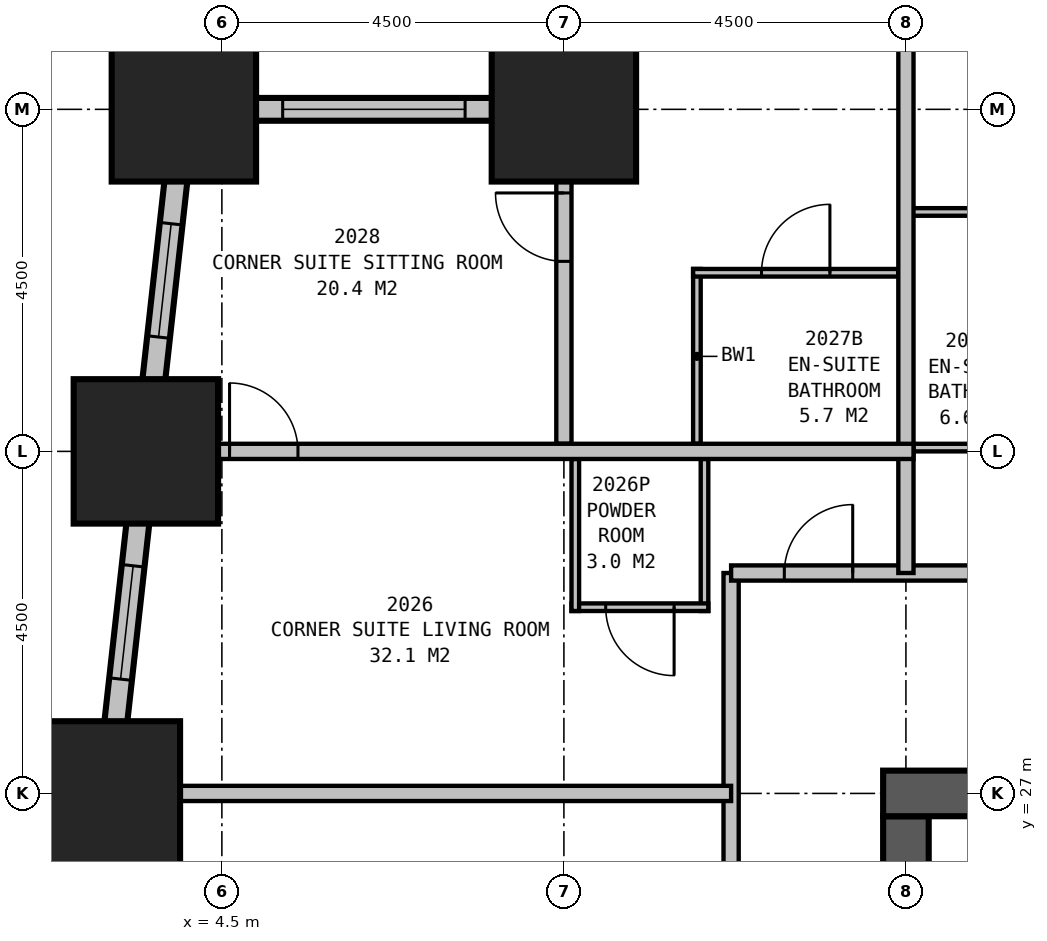
"""IFC4 building model, lengths in metres.
Left out: names, types, materials, properties, quantities, classifications, styles, units other than length and angle.
Written with IfcOpenShell. Run it as: python <this file> out.ifc"""

import sys

from ifc_helpers import new_model, si_unit, direction, frame, frame_2d, origin, origin_2d, place, context, subcontext, project, spatial, rectangle, extrude, element, fill, save


model = new_model("IFC4")
c1 = context("Model", 3, precision=1e-05, world=origin(), true_north=direction((0.0, 1.0)))
c2 = subcontext(c1, "Body", "Model", "MODEL_VIEW")
j1 = project(units=[si_unit("LENGTHUNIT", "METRE"), si_unit("PLANEANGLEUNIT", "RADIAN")], contexts=[c1])
p1 = place(None, origin())
s1 = spatial("IfcSite", under=j1, at=p1, CompositionType="ELEMENT")
p2 = place(p1, origin())
s2 = spatial("IfcBuilding", under=s1, at=p2, CompositionType="ELEMENT")
p3 = place(p2, frame((0.0, 0.0, 82.2)))
s3 = spatial("IfcBuildingStorey", under=s2, at=p3, CompositionType="ELEMENT", Elevation=82.2)
for number, where, z_axis, x_axis in (
    (1, (9.0, 36.0, 0.0), (0.0, 0.0, 1.0), (1.0, 0.0, 0.0)),
    (2, (4.0, 36.0, 0.0), (0.0, 0.0, 1.0), (1.0, 0.0, 0.0)),
    (3, (3.5, 31.5, 0.0), (0.0, 0.0, 1.0), (1.0, 0.0, 0.0)),
    (4, (3.0, 27.0, 0.0), (0.0, 0.0, 1.0), (1.0, 0.0, 0.0)),
):
    element("IfcColumn", number, at=place(p3, frame(where, z_axis=z_axis, x_axis=x_axis)), inside=s3, PredefinedType="COLUMN", context=c2, shape_type="SweptSolid", body=[
        extrude(rectangle(XDim=1.9, YDim=1.9, at=origin_2d()), origin(), (0.0, 0.0, 1.0), 3.5),
    ])
p4 = place(p3, frame((36.3, 27.0, 0.0), z_axis=(0.0, 0.0, 1.0), x_axis=(-1.0, 0.0, 0.0)))
e5 = element("IfcWall", 5, at=p4, inside=s3, PredefinedType="SHEAR", context=c2, shape_type="SweptSolid", body=[
    extrude(rectangle(XDim=23.1, YDim=0.6, at=frame_2d((11.55, 0.0))), origin(), (0.0, 0.0, 1.0), 3.5),
])
p5 = place(p4, frame((17.05, 0.0, 0.0)))
e6 = element("IfcOpeningElement", 6, at=p5, cuts=e5, PredefinedType="OPENING", context=c2, shape_type="SweptSolid", body=[
    extrude(rectangle(XDim=1.0, YDim=2.1, at=frame_2d((0.5, 1.05))), frame((0.0, 0.31, 0.0), z_axis=(0.0, -1.0, 0.0), x_axis=(1.0, 0.0, 0.0)), (0.0, 0.0, 1.0), 0.62),
])
p6 = place(p4, frame((12.05, 0.0, 0.0)))
e7 = element("IfcOpeningElement", 7, at=p6, cuts=e5, PredefinedType="OPENING", context=c2, shape_type="SweptSolid", body=[
    extrude(rectangle(XDim=1.0, YDim=2.1, at=frame_2d((0.5, 1.05))), frame((0.0, 0.31, 0.0), z_axis=(0.0, -1.0, 0.0), x_axis=(1.0, 0.0, 0.0)), (0.0, 0.0, 1.0), 0.62),
])
p7 = place(p4, frame((7.05, 0.0, 0.0)))
e8 = element("IfcOpeningElement", 8, at=p7, cuts=e5, PredefinedType="OPENING", context=c2, shape_type="SweptSolid", body=[
    extrude(rectangle(XDim=1.0, YDim=2.1, at=frame_2d((0.5, 1.05))), frame((0.0, 0.31, 0.0), z_axis=(0.0, -1.0, 0.0), x_axis=(1.0, 0.0, 0.0)), (0.0, 0.0, 1.0), 0.62),
])
p8 = place(p3, frame((13.5, 26.7, 0.0), z_axis=(0.0, 0.0, 1.0), x_axis=(0.0, -1.0, 0.0)))
e9 = element("IfcWall", 9, at=p8, inside=s3, PredefinedType="SHEAR", context=c2, shape_type="SweptSolid", body=[
    extrude(rectangle(XDim=6.7, YDim=0.6, at=frame_2d((3.35, 0.0))), origin(), (0.0, 0.0, 1.0), 3.5),
])
p9 = place(p3, frame((9.0, 40.65, 0.0), z_axis=(0.0, 0.0, 1.0), x_axis=(0.0, -1.0, 0.0)))
e10 = element("IfcWall", 10, at=p9, inside=s3, PredefinedType="STANDARD", context=c2, shape_type="SweptSolid", body=[
    extrude(rectangle(XDim=4.8, YDim=0.3, at=frame_2d((2.4, 0.0))), origin(), (0.0, 0.0, 1.0), 2.1),
])
p10 = place(p9, frame((1.65, 0.0, 0.5)))
e11 = element("IfcOpeningElement", 11, at=p10, cuts=e10, PredefinedType="OPENING", context=c2, shape_type="SweptSolid", body=[
    extrude(rectangle(XDim=1.5, YDim=1.4, at=frame_2d((0.75, 0.7))), frame((0.0, 0.16, 0.0), z_axis=(0.0, -1.0, 0.0), x_axis=(1.0, 0.0, 0.0)), (0.0, 0.0, 1.0), 0.32),
])
p11 = place(p3, frame((9.15, 36.0, 0.0), z_axis=(0.0, 0.0, 1.0), x_axis=(-1.0, 0.0, 0.0)))
e12 = element("IfcWall", 12, at=p11, inside=s3, PredefinedType="STANDARD", context=c2, shape_type="SweptSolid", body=[
    extrude(rectangle(XDim=5.3, YDim=0.3, at=frame_2d((2.65, 0.0))), origin(), (0.0, 0.0, 1.0), 2.1),
])
p12 = place(p11, frame((1.45, 0.0, 0.5)))
e13 = element("IfcOpeningElement", 13, at=p12, cuts=e12, PredefinedType="OPENING", context=c2, shape_type="SweptSolid", body=[
    extrude(rectangle(XDim=2.4, YDim=1.4, at=frame_2d((1.2, 0.7))), frame((0.0, 0.16, 0.0), z_axis=(0.0, -1.0, 0.0), x_axis=(1.0, 0.0, 0.0)), (0.0, 0.0, 1.0), 0.32),
])
p13 = place(p3, frame((4.017, 36.149, 0.0), z_axis=(0.0, 0.0, 1.0), x_axis=(-0.110433201132, -0.993883548555, 0.0)))
e14 = element("IfcWall", 14, at=p13, inside=s3, PredefinedType="STANDARD", context=c2, shape_type="SweptSolid", body=[
    extrude(rectangle(XDim=31.994, YDim=0.3, at=frame_2d((15.997, 0.0))), origin(), (0.0, 0.0, 1.0), 2.1),
])
p14 = place(p13, frame((1.664, 0.0, 0.5)))
e15 = element("IfcOpeningElement", 15, at=p14, cuts=e14, PredefinedType="OPENING", context=c2, shape_type="SweptSolid", body=[
    extrude(rectangle(XDim=1.5, YDim=1.4, at=frame_2d((0.75, 0.7))), frame((0.0, 0.16, 0.0), z_axis=(0.0, -1.0, 0.0), x_axis=(1.0, 0.0, 0.0)), (0.0, 0.0, 1.0), 0.32),
])
p15 = place(p13, frame((6.192, 0.0, 0.5)))
e16 = element("IfcOpeningElement", 16, at=p15, cuts=e14, PredefinedType="OPENING", context=c2, shape_type="SweptSolid", body=[
    extrude(rectangle(XDim=1.5, YDim=1.4, at=frame_2d((0.75, 0.7))), frame((0.0, 0.16, 0.0), z_axis=(0.0, -1.0, 0.0), x_axis=(1.0, 0.0, 0.0)), (0.0, 0.0, 1.0), 0.32),
])
p16 = place(p13, frame((10.719, 0.0, 0.5)))
e17 = element("IfcOpeningElement", 17, at=p16, cuts=e14, PredefinedType="OPENING", context=c2, shape_type="SweptSolid", body=[
    extrude(rectangle(XDim=1.5, YDim=1.4, at=frame_2d((0.75, 0.7))), frame((0.0, 0.16, 0.0), z_axis=(0.0, -1.0, 0.0), x_axis=(1.0, 0.0, 0.0)), (0.0, 0.0, 1.0), 0.32),
])
p17 = place(p13, frame((15.247, 0.0, 0.5)))
e18 = element("IfcOpeningElement", 18, at=p17, cuts=e14, PredefinedType="OPENING", context=c2, shape_type="SweptSolid", body=[
    extrude(rectangle(XDim=1.5, YDim=1.4, at=frame_2d((0.75, 0.7))), frame((0.0, 0.16, 0.0), z_axis=(0.0, -1.0, 0.0), x_axis=(1.0, 0.0, 0.0)), (0.0, 0.0, 1.0), 0.32),
])
p18 = place(p13, frame((19.775, 0.0, 0.5)))
e19 = element("IfcOpeningElement", 19, at=p18, cuts=e14, PredefinedType="OPENING", context=c2, shape_type="SweptSolid", body=[
    extrude(rectangle(XDim=1.5, YDim=1.4, at=frame_2d((0.75, 0.7))), frame((0.0, 0.16, 0.0), z_axis=(0.0, -1.0, 0.0), x_axis=(1.0, 0.0, 0.0)), (0.0, 0.0, 1.0), 0.32),
])
p19 = place(p13, frame((24.302, 0.0, 0.5)))
e20 = element("IfcOpeningElement", 20, at=p19, cuts=e14, PredefinedType="OPENING", context=c2, shape_type="SweptSolid", body=[
    extrude(rectangle(XDim=1.5, YDim=1.4, at=frame_2d((0.75, 0.7))), frame((0.0, 0.16, 0.0), z_axis=(0.0, -1.0, 0.0), x_axis=(1.0, 0.0, 0.0)), (0.0, 0.0, 1.0), 0.32),
])
p20 = place(p13, frame((28.83, 0.0, 0.5)))
e21 = element("IfcOpeningElement", 21, at=p20, cuts=e14, PredefinedType="OPENING", context=c2, shape_type="SweptSolid", body=[
    extrude(rectangle(XDim=1.5, YDim=1.4, at=frame_2d((0.75, 0.7))), frame((0.0, 0.16, 0.0), z_axis=(0.0, -1.0, 0.0), x_axis=(1.0, 0.0, 0.0)), (0.0, 0.0, 1.0), 0.32),
])
p21 = place(p3, frame((11.2, 29.9, 0.0), z_axis=(0.0, 0.0, 1.0), x_axis=(1.0, 0.0, 0.0)))
e22 = element("IfcWall", 22, at=p21, inside=s3, PredefinedType="PARTITIONING", context=c2, shape_type="SweptSolid", body=[
    extrude(rectangle(XDim=27.1, YDim=0.2, at=frame_2d((13.55, 0.0))), origin(), (0.0, 0.0, 1.0), 3.25),
])
p22 = place(p21, frame((5.05, 0.0, 0.0)))
e23 = element("IfcOpeningElement", 23, at=p22, cuts=e22, PredefinedType="OPENING", context=c2, shape_type="SweptSolid", body=[
    extrude(rectangle(XDim=0.9, YDim=2.1, at=frame_2d((0.45, 1.05))), frame((0.0, 0.11, 0.0), z_axis=(0.0, -1.0, 0.0), x_axis=(1.0, 0.0, 0.0)), (0.0, 0.0, 1.0), 0.22),
])
p23 = place(p21, frame((7.65, 0.0, 0.0)))
e24 = element("IfcOpeningElement", 24, at=p23, cuts=e22, PredefinedType="OPENING", context=c2, shape_type="SweptSolid", body=[
    extrude(rectangle(XDim=0.9, YDim=2.1, at=frame_2d((0.45, 1.05))), frame((0.0, 0.11, 0.0), z_axis=(0.0, -1.0, 0.0), x_axis=(1.0, 0.0, 0.0)), (0.0, 0.0, 1.0), 0.22),
])
p24 = place(p21, frame((12.0, 0.0, 0.0)))
e25 = element("IfcOpeningElement", 25, at=p24, cuts=e22, PredefinedType="OPENING", context=c2, shape_type="SweptSolid", body=[
    extrude(rectangle(XDim=1.0, YDim=2.1, at=frame_2d((0.5, 1.05))), frame((0.0, 0.11, 0.0), z_axis=(0.0, -1.0, 0.0), x_axis=(1.0, 0.0, 0.0)), (0.0, 0.0, 1.0), 0.22),
])
p25 = place(p21, frame((17.45, 0.0, 0.0)))
e26 = element("IfcOpeningElement", 26, at=p25, cuts=e22, PredefinedType="OPENING", context=c2, shape_type="SweptSolid", body=[
    extrude(rectangle(XDim=0.9, YDim=2.1, at=frame_2d((0.45, 1.05))), frame((0.0, 0.11, 0.0), z_axis=(0.0, -1.0, 0.0), x_axis=(1.0, 0.0, 0.0)), (0.0, 0.0, 1.0), 0.22),
])
p26 = place(p21, frame((21.8, 0.0, 0.0)))
e27 = element("IfcOpeningElement", 27, at=p26, cuts=e22, PredefinedType="OPENING", context=c2, shape_type="SweptSolid", body=[
    extrude(rectangle(XDim=0.9, YDim=2.1, at=frame_2d((0.45, 1.05))), frame((0.0, 0.11, 0.0), z_axis=(0.0, -1.0, 0.0), x_axis=(1.0, 0.0, 0.0)), (0.0, 0.0, 1.0), 0.22),
])
p27 = place(p21, frame((25.5, 0.0, 0.0)))
e28 = element("IfcOpeningElement", 28, at=p27, cuts=e22, PredefinedType="OPENING", context=c2, shape_type="SweptSolid", body=[
    extrude(rectangle(XDim=0.9, YDim=2.1, at=frame_2d((0.45, 1.05))), frame((0.0, 0.11, 0.0), z_axis=(0.0, -1.0, 0.0), x_axis=(1.0, 0.0, 0.0)), (0.0, 0.0, 1.0), 0.22),
])
p28 = place(p21, frame((0.7, 0.0, 0.0)))
e29 = element("IfcOpeningElement", 29, at=p28, cuts=e22, PredefinedType="OPENING", context=c2, shape_type="SweptSolid", body=[
    extrude(rectangle(XDim=0.9, YDim=2.1, at=frame_2d((0.45, 1.05))), frame((0.0, 0.11, 0.0), z_axis=(0.0, -1.0, 0.0), x_axis=(1.0, 0.0, 0.0)), (0.0, 0.0, 1.0), 0.22),
])
p29 = place(p3, frame((11.2, 11.2, 0.0), z_axis=(0.0, 0.0, 1.0), x_axis=(0.0, 1.0, 0.0)))
e30 = element("IfcWall", 30, at=p29, inside=s3, PredefinedType="PARTITIONING", context=c2, shape_type="SweptSolid", body=[
    extrude(rectangle(XDim=18.7, YDim=0.2, at=frame_2d((9.35, 0.0))), origin(), (0.0, 0.0, 1.0), 3.25),
])
p30 = place(p29, frame((3.05, 0.0, 0.0)))
e31 = element("IfcOpeningElement", 31, at=p30, cuts=e30, PredefinedType="OPENING", context=c2, shape_type="SweptSolid", body=[
    extrude(rectangle(XDim=1.0, YDim=2.1, at=frame_2d((0.5, 1.05))), frame((0.0, 0.11, 0.0), z_axis=(0.0, -1.0, 0.0), x_axis=(1.0, 0.0, 0.0)), (0.0, 0.0, 1.0), 0.22),
])
p31 = place(p29, frame((6.65, 0.0, 0.0)))
e32 = element("IfcOpeningElement", 32, at=p31, cuts=e30, PredefinedType="OPENING", context=c2, shape_type="SweptSolid", body=[
    extrude(rectangle(XDim=0.9, YDim=2.1, at=frame_2d((0.45, 1.05))), frame((0.0, 0.11, 0.0), z_axis=(0.0, -1.0, 0.0), x_axis=(1.0, 0.0, 0.0)), (0.0, 0.0, 1.0), 0.22),
])
for number, where, z_axis, x_axis in (
    (33, (13.5, 31.55, 0.0), (0.0, 0.0, 1.0), (1.0, 0.0, 0.0)),
    (34, (13.5, 34.65, 0.0), (0.0, 0.0, 1.0), (1.0, 0.0, 0.0)),
):
    element("IfcWall", number, at=place(p3, frame(where, z_axis=z_axis, x_axis=x_axis)), inside=s3, PredefinedType="PLUMBINGWALL", context=c2, shape_type="SweptSolid", body=[
        extrude(rectangle(XDim=2.4, YDim=0.1, at=frame_2d((1.2, 0.0))), origin(), (0.0, 0.0, 1.0), 3.25),
    ])
p32 = place(p3, frame((11.2, 27.0, 0.0), z_axis=(0.0, 0.0, 1.0), x_axis=(-1.0, 0.0, 0.0)))
e35 = element("IfcWall", 35, at=p32, inside=s3, PredefinedType="PARTITIONING", context=c2, shape_type="SweptSolid", body=[
    extrude(rectangle(XDim=7.977, YDim=0.2, at=frame_2d((3.988, 0.0))), origin(), (0.0, 0.0, 1.0), 1.9),
])
p33 = place(p3, frame((13.5, 29.9, 0.0), z_axis=(0.0, 0.0, 1.0), x_axis=(0.0, 1.0, 0.0)))
e36 = element("IfcWall", 36, at=p33, inside=s3, PredefinedType="PARTITIONING", context=c2, shape_type="SweptSolid", body=[
    extrude(rectangle(XDim=10.6, YDim=0.2, at=frame_2d((5.3, 0.0))), origin(), (0.0, 0.0, 1.0), 2.2),
])
p34 = place(p3, frame((13.6, 31.5, 0.0), z_axis=(0.0, 0.0, 1.0), x_axis=(-1.0, 0.0, 0.0)))
e37 = element("IfcWall", 37, at=p34, inside=s3, PredefinedType="PARTITIONING", context=c2, shape_type="SweptSolid", body=[
    extrude(rectangle(XDim=10.099, YDim=0.2, at=frame_2d((5.05, 0.0))), origin(), (0.0, 0.0, 1.0), 3.25),
])
p35 = place(p34, frame((8.999, 0.0, 0.0), z_axis=(0.0, 0.0, 1.0), x_axis=(-1.0, 0.0, 0.0)))
e38 = element("IfcOpeningElement", 38, at=p35, cuts=e37, PredefinedType="OPENING", context=c2, shape_type="SweptSolid", body=[
    extrude(rectangle(XDim=0.9, YDim=2.1, at=frame_2d((0.45, 1.05))), frame((0.0, 0.11, 0.0), z_axis=(0.0, -1.0, 0.0), x_axis=(1.0, 0.0, 0.0)), (0.0, 0.0, 1.0), 0.22),
])
p36 = place(p3, frame((9.15, 31.4, 0.0), z_axis=(0.0, 0.0, 1.0), x_axis=(0.0, -1.0, 0.0)))
e39 = element("IfcWall", 39, at=p36, inside=s3, PredefinedType="PLUMBINGWALL", context=c2, shape_type="SweptSolid", body=[
    extrude(rectangle(XDim=2.0, YDim=0.1, at=frame_2d((1.0, 0.0))), origin(), (0.0, 0.0, 1.0), 2.2),
])
p37 = place(p3, frame((10.85, 31.4, 0.0), z_axis=(0.0, 0.0, 1.0), x_axis=(0.0, -1.0, 0.0)))
e40 = element("IfcWall", 40, at=p37, inside=s3, PredefinedType="PLUMBINGWALL", context=c2, shape_type="SweptSolid", body=[
    extrude(rectangle(XDim=2.0, YDim=0.1, at=frame_2d((1.0, 0.0))), origin(), (0.0, 0.0, 1.0), 3.25),
])
p38 = place(p3, frame((10.9, 29.45, 0.0), z_axis=(0.0, 0.0, 1.0), x_axis=(-1.0, 0.0, 0.0)))
e41 = element("IfcWall", 41, at=p38, inside=s3, PredefinedType="PLUMBINGWALL", context=c2, shape_type="SweptSolid", body=[
    extrude(rectangle(XDim=1.8, YDim=0.1, at=frame_2d((0.9, 0.0))), origin(), (0.0, 0.0, 1.0), 3.25),
])
p39 = place(p38, frame((0.45, 0.0, 0.0)))
e42 = element("IfcOpeningElement", 42, at=p39, cuts=e41, PredefinedType="OPENING", context=c2, shape_type="SweptSolid", body=[
    extrude(rectangle(XDim=0.9, YDim=2.1, at=frame_2d((0.45, 1.05))), frame((0.0, 0.06, 0.0), z_axis=(0.0, -1.0, 0.0), x_axis=(1.0, 0.0, 0.0)), (0.0, 0.0, 1.0), 0.12),
])
p40 = place(p3, frame((9.0, 31.6, 0.0), z_axis=(0.0, 0.0, 1.0), x_axis=(0.0, 1.0, 0.0)))
e43 = element("IfcWall", 43, at=p40, inside=s3, PredefinedType="PARTITIONING", context=c2, shape_type="SweptSolid", body=[
    extrude(rectangle(XDim=4.4, YDim=0.2, at=frame_2d((2.2, 0.0))), origin(), (0.0, 0.0, 1.0), 2.2),
])
p41 = place(p40, frame((2.4, 0.0, 0.0)))
e44 = element("IfcOpeningElement", 44, at=p41, cuts=e43, PredefinedType="OPENING", context=c2, shape_type="SweptSolid", body=[
    extrude(rectangle(XDim=0.9, YDim=2.1, at=frame_2d((0.45, 1.05))), frame((0.0, 0.11, 0.0), z_axis=(0.0, -1.0, 0.0), x_axis=(1.0, 0.0, 0.0)), (0.0, 0.0, 1.0), 0.22),
])
p42 = place(p3, frame((10.75, 31.6, 0.0), z_axis=(0.0, 0.0, 1.0), x_axis=(0.0, 1.0, 0.0)))
e45 = element("IfcWall", 45, at=p42, inside=s3, PredefinedType="PLUMBINGWALL", context=c2, shape_type="SweptSolid", body=[
    extrude(rectangle(XDim=2.3, YDim=0.1, at=frame_2d((1.15, 0.0))), origin(), (0.0, 0.0, 1.0), 3.25),
])
p43 = place(p3, frame((13.4, 33.85, 0.0), z_axis=(0.0, 0.0, 1.0), x_axis=(-1.0, 0.0, 0.0)))
e46 = element("IfcWall", 46, at=p43, inside=s3, PredefinedType="PLUMBINGWALL", context=c2, shape_type="SweptSolid", body=[
    extrude(rectangle(XDim=2.7, YDim=0.1, at=frame_2d((1.35, 0.0))), origin(), (0.0, 0.0, 1.0), 3.25),
])
p44 = place(p43, frame((1.8, 0.0, 0.0), z_axis=(0.0, 0.0, 1.0), x_axis=(-1.0, 0.0, 0.0)))
e47 = element("IfcOpeningElement", 47, at=p44, cuts=e46, PredefinedType="OPENING", context=c2, shape_type="SweptSolid", body=[
    extrude(rectangle(XDim=0.9, YDim=2.1, at=frame_2d((0.45, 1.05))), frame((0.0, 0.06, 0.0), z_axis=(0.0, -1.0, 0.0), x_axis=(1.0, 0.0, 0.0)), (0.0, 0.0, 1.0), 0.12),
])
p45 = place(p12, origin())
e48 = element("IfcWindow", 48, at=p45, inside=s3, PartitioningType="SINGLE_PANEL", PredefinedType="WINDOW", context=c2, shape_type="SweptSolid", body=[
    extrude(rectangle(XDim=2.4, YDim=1.4, at=frame_2d((1.2, 0.7))), frame((0.0, 0.03, 0.0), z_axis=(0.0, -1.0, 0.0), x_axis=(1.0, 0.0, 0.0)), (0.0, 0.0, 1.0), 0.06),
])
fill(e13, e48)
p46 = place(p14, origin())
e49 = element("IfcWindow", 49, at=p46, inside=s3, PartitioningType="SINGLE_PANEL", PredefinedType="WINDOW", context=c2, shape_type="SweptSolid", body=[
    extrude(rectangle(XDim=1.5, YDim=1.4, at=frame_2d((0.75, 0.7))), frame((0.0, 0.03, 0.0), z_axis=(0.0, -1.0, 0.0), x_axis=(1.0, 0.0, 0.0)), (0.0, 0.0, 1.0), 0.06),
])
fill(e15, e49)
p47 = place(p15, origin())
e50 = element("IfcWindow", 50, at=p47, inside=s3, PartitioningType="SINGLE_PANEL", PredefinedType="WINDOW", context=c2, shape_type="SweptSolid", body=[
    extrude(rectangle(XDim=1.5, YDim=1.4, at=frame_2d((0.75, 0.7))), frame((0.0, 0.03, 0.0), z_axis=(0.0, -1.0, 0.0), x_axis=(1.0, 0.0, 0.0)), (0.0, 0.0, 1.0), 0.06),
])
fill(e16, e50)
p48 = place(p28, origin())
e51 = element("IfcDoor", 51, at=p48, inside=s3, OperationType="SINGLE_SWING_RIGHT", PredefinedType="DOOR", context=c2, shape_type="SweptSolid", body=[
    extrude(rectangle(XDim=0.9, YDim=2.1, at=frame_2d((0.45, 1.05))), frame((0.0, 0.025, 0.0), z_axis=(0.0, -1.0, 0.0), x_axis=(1.0, 0.0, 0.0)), (0.0, 0.0, 1.0), 0.05),
])
fill(e29, e51)
p49 = place(p35, origin())
e52 = element("IfcDoor", 52, at=p49, inside=s3, OperationType="SINGLE_SWING_LEFT", PredefinedType="DOOR", context=c2, shape_type="SweptSolid", body=[
    extrude(rectangle(XDim=0.9, YDim=2.1, at=frame_2d((0.45, 1.05))), frame((0.0, 0.025, 0.0), z_axis=(0.0, -1.0, 0.0), x_axis=(1.0, 0.0, 0.0)), (0.0, 0.0, 1.0), 0.05),
])
fill(e38, e52)
p50 = place(p39, origin())
e53 = element("IfcDoor", 53, at=p50, inside=s3, OperationType="SINGLE_SWING_LEFT", PredefinedType="DOOR", context=c2, shape_type="SweptSolid", body=[
    extrude(rectangle(XDim=0.9, YDim=2.1, at=frame_2d((0.45, 1.05))), frame((0.0, 0.025, 0.0), z_axis=(0.0, -1.0, 0.0), x_axis=(1.0, 0.0, 0.0)), (0.0, 0.0, 1.0), 0.05),
])
fill(e42, e53)
p51 = place(p41, origin())
e54 = element("IfcDoor", 54, at=p51, inside=s3, OperationType="SINGLE_SWING_RIGHT", PredefinedType="DOOR", context=c2, shape_type="SweptSolid", body=[
    extrude(rectangle(XDim=0.9, YDim=2.1, at=frame_2d((0.45, 1.05))), frame((0.0, 0.025, 0.0), z_axis=(0.0, -1.0, 0.0), x_axis=(1.0, 0.0, 0.0)), (0.0, 0.0, 1.0), 0.05),
])
fill(e44, e54)
p52 = place(p44, origin())
e55 = element("IfcDoor", 55, at=p52, inside=s3, OperationType="SINGLE_SWING_RIGHT", PredefinedType="DOOR", context=c2, shape_type="SweptSolid", body=[
    extrude(rectangle(XDim=0.9, YDim=2.1, at=frame_2d((0.45, 1.05))), frame((0.0, 0.025, 0.0), z_axis=(0.0, -1.0, 0.0), x_axis=(1.0, 0.0, 0.0)), (0.0, 0.0, 1.0), 0.05),
])
fill(e47, e55)
save(model, sys.argv[1])
